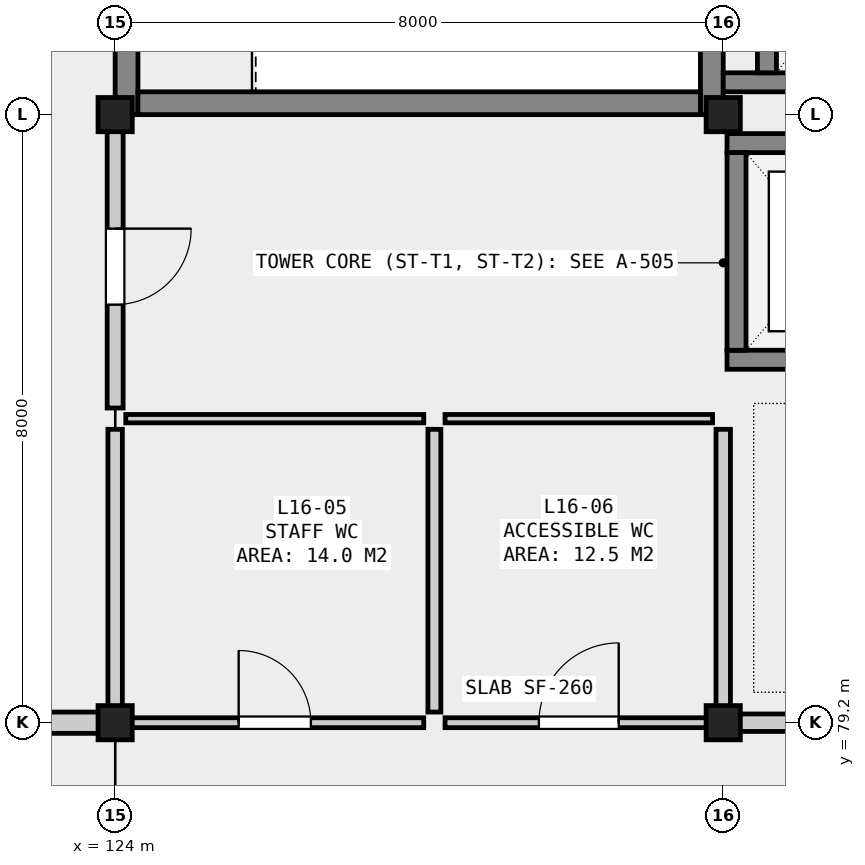
"""IFC4 building model, lengths in metres.
Left out: names, types, materials, properties, quantities, classifications, styles, units other than length and angle.
Written with IfcOpenShell. Run it as: python <this file> out.ifc"""

import sys

from ifc_helpers import new_model, si_unit, direction, frame, frame_2d, origin, origin_2d, place, context, subcontext, project, spatial, rectangle, extrude, element, fill, save


model = new_model("IFC4")
c1 = context("Model", 3, precision=1e-05, world=origin(), true_north=direction((0.0, 1.0)))
c2 = subcontext(c1, "Body", "Model", "MODEL_VIEW")
j1 = project(units=[si_unit("LENGTHUNIT", "METRE"), si_unit("PLANEANGLEUNIT", "RADIAN")], contexts=[c1])
p1 = place(None, origin())
s1 = spatial("IfcSite", under=j1, at=p1, CompositionType="ELEMENT")
p2 = place(p1, origin())
s2 = spatial("IfcBuilding", under=s1, at=p2, CompositionType="ELEMENT")
p3 = place(p2, frame((0.0, 0.0, 66.6)))
s3 = spatial("IfcBuildingStorey", under=s2, at=p3, CompositionType="ELEMENT", Elevation=66.6)
p4 = place(p3, frame((124.0, 79.2, 0.0), z_axis=(0.0, 0.0, 1.0), x_axis=(1.0, 0.0, 0.0)))
e1 = element("IfcColumn", 1, at=p4, inside=s3, PredefinedType="COLUMN", context=c2, shape_type="SweptSolid", body=[
    extrude(rectangle(XDim=0.45, YDim=0.45, at=origin_2d()), origin(), (0.0, 0.0, 1.0), 6.28),
])
for number, where, z_axis, x_axis in (
    (2, (124.0, 87.2, 0.0), (0.0, 0.0, 1.0), (1.0, 0.0, 0.0)),
    (3, (132.0, 79.2, 0.0), (0.0, 0.0, 1.0), (1.0, 0.0, 0.0)),
    (4, (132.0, 87.2, 0.0), (0.0, 0.0, 1.0), (1.0, 0.0, 0.0)),
):
    element("IfcColumn", number, at=place(p3, frame(where, z_axis=z_axis, x_axis=x_axis)), inside=s3, PredefinedType="COLUMN", context=c2, shape_type="SweptSolid", body=[
        extrude(rectangle(XDim=0.45, YDim=0.45, at=origin_2d()), origin(), (0.0, 0.0, 1.0), 4.5),
    ])
p5 = place(p3, frame((120.4, 79.2, 6.28), z_axis=(0.0, 0.0, 1.0), x_axis=(1.0, 0.0, 0.0)))
e5 = element("IfcWall", 5, at=p5, inside=s3, PredefinedType="SOLIDWALL", context=c2, shape_type="SweptSolid", body=[
    extrude(rectangle(XDim=3.6, YDim=0.28, at=frame_2d((1.8, 0.0))), origin(), (0.0, 0.0, 1.0), 0.521),
])
for number, where, z_axis, x_axis in (
    (6, (124.15, 87.2, 0.0), (0.0, 0.0, 1.0), (0.0, 1.0, 0.0)),
    (7, (131.85, 87.2, 0.0), (0.0, 0.0, 1.0), (0.0, 1.0, 0.0)),
):
    element("IfcWall", number, at=place(p3, frame(where, z_axis=z_axis, x_axis=x_axis)), inside=s3, PredefinedType="SHEAR", context=c2, shape_type="SweptSolid", body=[
        extrude(rectangle(XDim=4.2, YDim=0.3, at=frame_2d((2.1, 0.0))), origin(), (0.0, 0.0, 1.0), 3.55),
    ])
p6 = place(p3, frame((124.3, 87.35, 0.0), z_axis=(0.0, 0.0, 1.0), x_axis=(1.0, 0.0, 0.0)))
e8 = element("IfcWall", 8, at=p6, inside=s3, PredefinedType="SHEAR", context=c2, shape_type="SweptSolid", body=[
    extrude(rectangle(XDim=7.4, YDim=0.3, at=frame_2d((3.7, 0.0))), origin(), (0.0, 0.0, 1.0), 3.55),
])
p7 = place(p3, frame((132.0, 87.625, 0.0), z_axis=(0.0, 0.0, 1.0), x_axis=(1.0, 0.0, 0.0)))
e9 = element("IfcWall", 9, at=p7, inside=s3, PredefinedType="SHEAR", context=c2, shape_type="SweptSolid", body=[
    extrude(rectangle(XDim=3.15, YDim=0.25, at=frame_2d((1.575, 0.0))), origin(), (0.0, 0.0, 1.0), 3.55),
])
p8 = place(p3, frame((132.575, 87.75, 0.0), z_axis=(0.0, 0.0, 1.0), x_axis=(0.0, 1.0, 0.0)))
e10 = element("IfcWall", 10, at=p8, inside=s3, PredefinedType="SHEAR", context=c2, shape_type="SweptSolid", body=[
    extrude(rectangle(XDim=2.9, YDim=0.25, at=frame_2d((1.45, 0.0))), origin(), (0.0, 0.0, 1.0), 3.55),
])
p9 = place(p3, frame((132.05, 83.975, 0.0), z_axis=(0.0, 0.0, 1.0), x_axis=(1.0, 0.0, 0.0)))
e11 = element("IfcWall", 11, at=p9, inside=s3, PredefinedType="SHEAR", context=c2, shape_type="SweptSolid", body=[
    extrude(rectangle(XDim=2.7, YDim=0.25, at=frame_2d((1.35, 0.0))), origin(), (0.0, 0.0, 1.0), 3.55),
])
p10 = place(p9, frame((0.8, 0.0, 0.0)))
e12 = element("IfcOpeningElement", 12, at=p10, cuts=e11, PredefinedType="OPENING", context=c2, shape_type="SweptSolid", body=[
    extrude(rectangle(XDim=1.1, YDim=2.15, at=frame_2d((0.55, 1.075))), frame((0.0, 0.137, 0.0), z_axis=(0.0, -1.0, 0.0), x_axis=(1.0, 0.0, 0.0)), (0.0, 0.0, 1.0), 0.274),
])
p11 = place(p3, frame((132.05, 86.825, 0.0), z_axis=(0.0, 0.0, 1.0), x_axis=(1.0, 0.0, 0.0)))
e13 = element("IfcWall", 13, at=p11, inside=s3, PredefinedType="SHEAR", context=c2, shape_type="SweptSolid", body=[
    extrude(rectangle(XDim=2.7, YDim=0.25, at=frame_2d((1.35, 0.0))), origin(), (0.0, 0.0, 1.0), 3.55),
])
p12 = place(p3, frame((132.175, 84.1, 0.0), z_axis=(0.0, 0.0, 1.0), x_axis=(0.0, 1.0, 0.0)))
e14 = element("IfcWall", 14, at=p12, inside=s3, PredefinedType="SHEAR", context=c2, shape_type="SweptSolid", body=[
    extrude(rectangle(XDim=2.6, YDim=0.25, at=frame_2d((1.3, 0.0))), origin(), (0.0, 0.0, 1.0), 3.55),
])
p13 = place(p3, frame((124.14, 79.2, 0.0), z_axis=(0.0, 0.0, 1.0), x_axis=(1.0, 0.0, 0.0)))
e15 = element("IfcWall", 15, at=p13, inside=s3, PredefinedType="PARTITIONING", context=c2, shape_type="SweptSolid", body=[
    extrude(rectangle(XDim=3.92, YDim=0.13, at=frame_2d((1.96, 0.0))), origin(), (0.0, 0.0, 1.0), 3.55),
])
p14 = place(p13, frame((1.485, 0.0, 0.0)))
e16 = element("IfcOpeningElement", 16, at=p14, cuts=e15, PredefinedType="OPENING", context=c2, shape_type="SweptSolid", body=[
    extrude(rectangle(XDim=0.95, YDim=2.15, at=frame_2d((0.475, 1.075))), frame((0.0, 0.077, 0.0), z_axis=(0.0, -1.0, 0.0), x_axis=(1.0, 0.0, 0.0)), (0.0, 0.0, 1.0), 0.154),
])
p15 = place(p3, frame((124.14, 83.2, 0.0), z_axis=(0.0, 0.0, 1.0), x_axis=(1.0, 0.0, 0.0)))
e17 = element("IfcWall", 17, at=p15, inside=s3, PredefinedType="PARTITIONING", context=c2, shape_type="SweptSolid", body=[
    extrude(rectangle(XDim=3.92, YDim=0.11, at=frame_2d((1.96, 0.0))), origin(), (0.0, 0.0, 1.0), 3.55),
])
p16 = place(p3, frame((124.0, 79.34, 0.0), z_axis=(0.0, 0.0, 1.0), x_axis=(0.0, 1.0, 0.0)))
e18 = element("IfcWall", 18, at=p16, inside=s3, PredefinedType="PARTITIONING", context=c2, shape_type="SweptSolid", body=[
    extrude(rectangle(XDim=3.72, YDim=0.19, at=frame_2d((1.86, 0.0))), origin(), (0.0, 0.0, 1.0), 3.55),
])
p17 = place(p3, frame((128.2, 79.34, 0.0), z_axis=(0.0, 0.0, 1.0), x_axis=(0.0, 1.0, 0.0)))
e19 = element("IfcWall", 19, at=p17, inside=s3, PredefinedType="PARTITIONING", context=c2, shape_type="SweptSolid", body=[
    extrude(rectangle(XDim=3.72, YDim=0.17, at=frame_2d((1.86, 0.0))), origin(), (0.0, 0.0, 1.0), 3.55),
])
p18 = place(p3, frame((128.34, 79.2, 0.0), z_axis=(0.0, 0.0, 1.0), x_axis=(1.0, 0.0, 0.0)))
e20 = element("IfcWall", 20, at=p18, inside=s3, PredefinedType="PARTITIONING", context=c2, shape_type="SweptSolid", body=[
    extrude(rectangle(XDim=3.52, YDim=0.13, at=frame_2d((1.76, 0.0))), origin(), (0.0, 0.0, 1.0), 3.55),
])
p19 = place(p18, frame((1.235, 0.0, 0.0)))
e21 = element("IfcOpeningElement", 21, at=p19, cuts=e20, PredefinedType="OPENING", context=c2, shape_type="SweptSolid", body=[
    extrude(rectangle(XDim=1.05, YDim=2.15, at=frame_2d((0.525, 1.075))), frame((0.0, 0.077, 0.0), z_axis=(0.0, -1.0, 0.0), x_axis=(1.0, 0.0, 0.0)), (0.0, 0.0, 1.0), 0.154),
])
p20 = place(p3, frame((128.34, 83.2, 0.0), z_axis=(0.0, 0.0, 1.0), x_axis=(1.0, 0.0, 0.0)))
e22 = element("IfcWall", 22, at=p20, inside=s3, PredefinedType="PARTITIONING", context=c2, shape_type="SweptSolid", body=[
    extrude(rectangle(XDim=3.52, YDim=0.11, at=frame_2d((1.76, 0.0))), origin(), (0.0, 0.0, 1.0), 3.55),
])
p21 = place(p3, frame((132.0, 79.34, 0.0), z_axis=(0.0, 0.0, 1.0), x_axis=(0.0, 1.0, 0.0)))
e23 = element("IfcWall", 23, at=p21, inside=s3, PredefinedType="PARTITIONING", context=c2, shape_type="SweptSolid", body=[
    extrude(rectangle(XDim=3.72, YDim=0.19, at=frame_2d((1.86, 0.0))), origin(), (0.0, 0.0, 1.0), 3.55),
])
p22 = place(p3, frame((124.0, 83.34, 0.0), z_axis=(0.0, 0.0, 1.0), x_axis=(0.0, 1.0, 0.0)))
e24 = element("IfcWall", 24, at=p22, inside=s3, PredefinedType="SOLIDWALL", context=c2, shape_type="SweptSolid", body=[
    extrude(rectangle(XDim=3.72, YDim=0.21, at=frame_2d((1.86, 0.0))), origin(), (0.0, 0.0, 1.0), 3.55),
])
p23 = place(p22, frame((1.36, 0.0, 0.0)))
e25 = element("IfcOpeningElement", 25, at=p23, cuts=e24, PredefinedType="OPENING", context=c2, shape_type="SweptSolid", body=[
    extrude(rectangle(XDim=1.0, YDim=2.15, at=frame_2d((0.5, 1.075))), frame((0.0, 0.117, 0.0), z_axis=(0.0, -1.0, 0.0), x_axis=(1.0, 0.0, 0.0)), (0.0, 0.0, 1.0), 0.234),
])
p24 = place(p3, frame((132.14, 79.2, 0.0), z_axis=(0.0, 0.0, 1.0), x_axis=(1.0, 0.0, 0.0)))
e26 = element("IfcWall", 26, at=p24, inside=s3, PredefinedType="SOLIDWALL", context=c2, shape_type="SweptSolid", body=[
    extrude(rectangle(XDim=7.72, YDim=0.23, at=frame_2d((3.86, 0.0))), origin(), (0.0, 0.0, 1.0), 3.55),
])
p25 = place(p24, frame((3.11, 0.0, 0.0)))
e27 = element("IfcOpeningElement", 27, at=p25, cuts=e26, PredefinedType="OPENING", context=c2, shape_type="SweptSolid", body=[
    extrude(rectangle(XDim=1.5, YDim=2.2, at=frame_2d((0.75, 1.1))), frame((0.0, 0.127, 0.0), z_axis=(0.0, -1.0, 0.0), x_axis=(1.0, 0.0, 0.0)), (0.0, 0.0, 1.0), 0.254),
])
p26 = place(p14, origin())
e28 = element("IfcDoor", 28, at=p26, inside=s3, OperationType="SINGLE_SWING_LEFT", PredefinedType="DOOR", context=c2, shape_type="SweptSolid", body=[
    extrude(rectangle(XDim=0.95, YDim=2.15, at=frame_2d((0.475, 1.075))), frame((0.0, 0.025, 0.0), z_axis=(0.0, -1.0, 0.0), x_axis=(1.0, 0.0, 0.0)), (0.0, 0.0, 1.0), 0.05),
])
fill(e16, e28)
p27 = place(p19, origin())
e29 = element("IfcDoor", 29, at=p27, inside=s3, OperationType="SINGLE_SWING_RIGHT", PredefinedType="DOOR", context=c2, shape_type="SweptSolid", body=[
    extrude(rectangle(XDim=1.05, YDim=2.15, at=frame_2d((0.525, 1.075))), frame((0.0, 0.025, 0.0), z_axis=(0.0, -1.0, 0.0), x_axis=(1.0, 0.0, 0.0)), (0.0, 0.0, 1.0), 0.05),
])
fill(e21, e29)
p28 = place(p23, frame((1.0, 0.0, 0.0), z_axis=(0.0, 0.0, 1.0), x_axis=(-1.0, 0.0, 0.0)))
e30 = element("IfcDoor", 30, at=p28, inside=s3, OperationType="SINGLE_SWING_LEFT", PredefinedType="DOOR", context=c2, shape_type="SweptSolid", body=[
    extrude(rectangle(XDim=1.0, YDim=2.15, at=frame_2d((0.5, 1.075))), frame((0.0, 0.025, 0.0), z_axis=(0.0, -1.0, 0.0), x_axis=(1.0, 0.0, 0.0)), (0.0, 0.0, 1.0), 0.05),
])
fill(e25, e30)
save(model, sys.argv[1])
